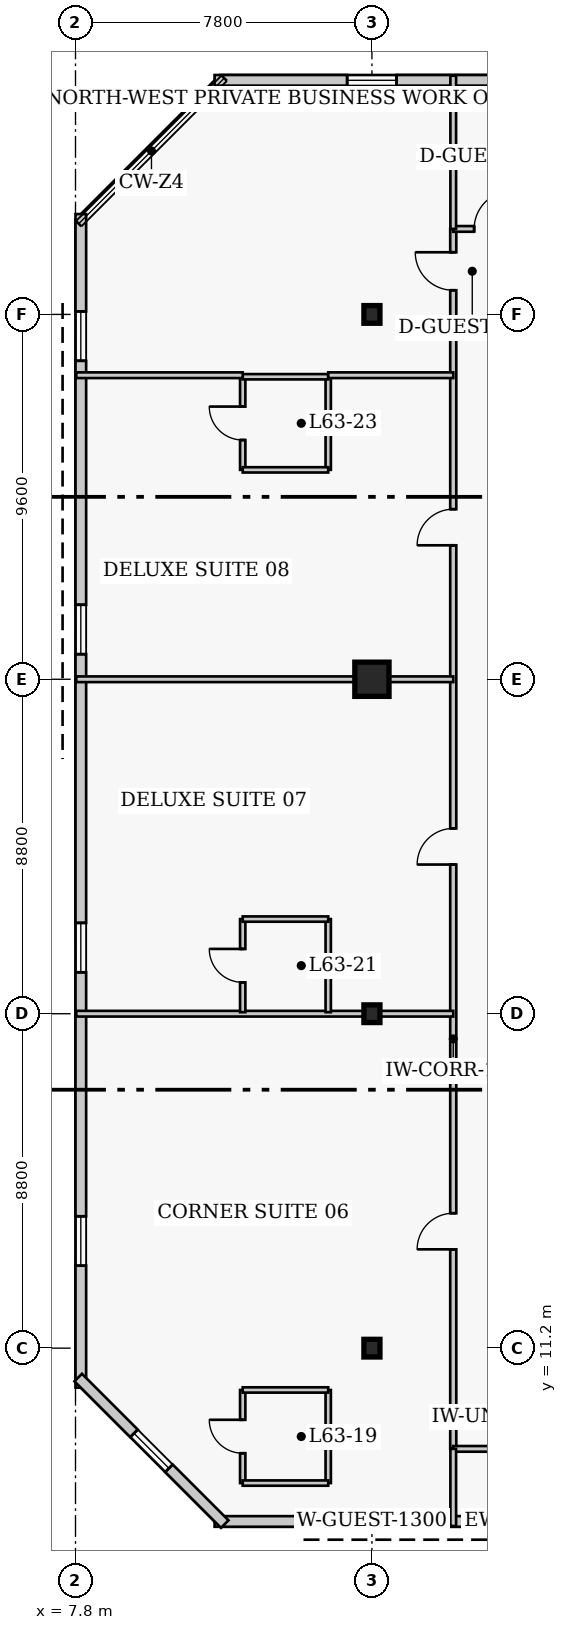
"""IFC4 building model, lengths in metres.
Left out: names, types, materials, properties, quantities, classifications, styles, units other than length and angle.
Written with IfcOpenShell. Run it as: python <this file> out.ifc"""

import sys

from ifc_helpers import new_model, si_unit, direction, frame, frame_2d, origin, origin_2d, place, context, subcontext, project, spatial, rectangle, i_section, extrude, element, fill, save


model = new_model("IFC4")
c1 = context("Model", 3, precision=1e-05, world=origin(), true_north=direction((0.0, 1.0)))
c2 = subcontext(c1, "Body", "Model", "MODEL_VIEW")
j1 = project(units=[si_unit("LENGTHUNIT", "METRE"), si_unit("PLANEANGLEUNIT", "RADIAN")], contexts=[c1])
p1 = place(None, origin())
s1 = spatial("IfcSite", under=j1, at=p1, CompositionType="ELEMENT")
p2 = place(p1, origin())
s2 = spatial("IfcBuilding", under=s1, at=p2, CompositionType="ELEMENT")
p3 = place(p2, frame((0.0, 0.0, 253.4)))
s3 = spatial("IfcBuildingStorey", under=s2, at=p3, CompositionType="ELEMENT", Elevation=253.4)
for number, where, z_axis, x_axis in (
    (1, (15.6, 11.2, 0.0), (0.0, 0.0, 1.0), (1.0, 0.0, 0.0)),
    (2, (15.6, 20.0, 0.0), (0.0, 0.0, 1.0), (1.0, 0.0, 0.0)),
):
    element("IfcColumn", number, at=place(p3, frame(where, z_axis=z_axis, x_axis=x_axis)), inside=s3, PredefinedType="COLUMN", context=c2, shape_type="SweptSolid", body=[
        extrude(i_section(OverallWidth=0.422, OverallDepth=0.465, WebThickness=0.045, FlangeThickness=0.073, FilletRadius=0.017, at=origin_2d()), origin(), (0.0, 0.0, 1.0), 4.0),
    ])
p4 = place(p3, frame((15.6, 28.8, 0.0), z_axis=(0.0, 0.0, 1.0), x_axis=(1.0, 0.0, 0.0)))
e3 = element("IfcColumn", 3, at=p4, inside=s3, PredefinedType="COLUMN", context=c2, shape_type="SweptSolid", body=[
    extrude(rectangle(XDim=0.9, YDim=0.9, at=origin_2d()), origin(), (0.0, 0.0, 1.0), 4.0),
])
p5 = place(p3, frame((15.6, 38.4, 0.0), z_axis=(0.0, 0.0, 1.0), x_axis=(1.0, 0.0, 0.0)))
e4 = element("IfcColumn", 4, at=p5, inside=s3, PredefinedType="COLUMN", context=c2, shape_type="SweptSolid", body=[
    extrude(i_section(OverallWidth=0.422, OverallDepth=0.465, WebThickness=0.045, FlangeThickness=0.073, FilletRadius=0.017, at=origin_2d()), origin(), (0.0, 0.0, 1.0), 4.0),
])
p6 = place(p3, frame((11.46, 6.64, 0.0), z_axis=(0.0, 0.0, 1.0), x_axis=(1.0, 0.0, 0.0)))
e5 = element("IfcWall", 5, at=p6, inside=s3, PredefinedType="SOLIDWALL", context=c2, shape_type="SweptSolid", body=[
    extrude(rectangle(XDim=24.83, YDim=0.28, at=frame_2d((12.415, 0.0))), origin(), (0.0, 0.0, 1.0), 3.76),
])
p7 = place(p6, frame((3.488, 0.0, 0.85)))
e6 = element("IfcOpeningElement", 6, at=p7, cuts=e5, PredefinedType="OPENING", context=c2, shape_type="SweptSolid", body=[
    extrude(rectangle(XDim=1.3, YDim=1.7, at=frame_2d((0.65, 0.85))), frame((0.0, 0.15, 0.0), z_axis=(0.0, -1.0, 0.0), x_axis=(1.0, 0.0, 0.0)), (0.0, 0.0, 1.0), 0.3),
])
p8 = place(p6, frame((20.692, 0.0, 0.85)))
e7 = element("IfcOpeningElement", 7, at=p8, cuts=e5, PredefinedType="OPENING", context=c2, shape_type="SweptSolid", body=[
    extrude(rectangle(XDim=1.3, YDim=1.7, at=frame_2d((0.65, 0.85))), frame((0.0, 0.15, 0.0), z_axis=(0.0, -1.0, 0.0), x_axis=(1.0, 0.0, 0.0)), (0.0, 0.0, 1.0), 0.3),
])
p9 = place(p6, frame((9.82, 0.0, 0.85)))
e8 = element("IfcOpeningElement", 8, at=p9, cuts=e5, PredefinedType="OPENING", context=c2, shape_type="SweptSolid", body=[
    extrude(rectangle(XDim=1.3, YDim=1.7, at=frame_2d((0.65, 0.85))), frame((0.0, 0.15, 0.0), z_axis=(0.0, -1.0, 0.0), x_axis=(1.0, 0.0, 0.0)), (0.0, 0.0, 1.0), 0.3),
])
p10 = place(p6, frame((16.125, 0.0, 0.85)))
e9 = element("IfcOpeningElement", 9, at=p10, cuts=e5, PredefinedType="OPENING", context=c2, shape_type="SweptSolid", body=[
    extrude(rectangle(XDim=1.3, YDim=1.7, at=frame_2d((0.65, 0.85))), frame((0.0, 0.15, 0.0), z_axis=(0.0, -1.0, 0.0), x_axis=(1.0, 0.0, 0.0)), (0.0, 0.0, 1.0), 0.3),
])
p11 = place(p3, frame((36.29, 44.56, 0.0), z_axis=(0.0, 0.0, 1.0), x_axis=(-1.0, 0.0, 0.0)))
e10 = element("IfcWall", 10, at=p11, inside=s3, PredefinedType="SOLIDWALL", context=c2, shape_type="SweptSolid", body=[
    extrude(rectangle(XDim=24.83, YDim=0.28, at=frame_2d((12.415, 0.0))), origin(), (0.0, 0.0, 1.0), 3.76),
])
p12 = place(p11, frame((3.488, 0.0, 0.85)))
e11 = element("IfcOpeningElement", 11, at=p12, cuts=e10, PredefinedType="OPENING", context=c2, shape_type="SweptSolid", body=[
    extrude(rectangle(XDim=1.3, YDim=1.7, at=frame_2d((0.65, 0.85))), frame((0.0, 0.15, 0.0), z_axis=(0.0, -1.0, 0.0), x_axis=(1.0, 0.0, 0.0)), (0.0, 0.0, 1.0), 0.3),
])
p13 = place(p11, frame((11.765, 0.0, 0.85)))
e12 = element("IfcOpeningElement", 12, at=p13, cuts=e10, PredefinedType="OPENING", context=c2, shape_type="SweptSolid", body=[
    extrude(rectangle(XDim=1.3, YDim=1.7, at=frame_2d((0.65, 0.85))), frame((0.0, 0.15, 0.0), z_axis=(0.0, -1.0, 0.0), x_axis=(1.0, 0.0, 0.0)), (0.0, 0.0, 1.0), 0.3),
])
p14 = place(p11, frame((20.042, 0.0, 0.85)))
e13 = element("IfcOpeningElement", 13, at=p14, cuts=e10, PredefinedType="OPENING", context=c2, shape_type="SweptSolid", body=[
    extrude(rectangle(XDim=1.3, YDim=1.7, at=frame_2d((0.65, 0.85))), frame((0.0, 0.15, 0.0), z_axis=(0.0, -1.0, 0.0), x_axis=(1.0, 0.0, 0.0)), (0.0, 0.0, 1.0), 0.3),
])
p15 = place(p3, frame((7.94, 41.04, 0.0), z_axis=(0.0, 0.0, 1.0), x_axis=(0.0, -1.0, 0.0)))
e14 = element("IfcWall", 14, at=p15, inside=s3, PredefinedType="SOLIDWALL", context=c2, shape_type="SweptSolid", body=[
    extrude(rectangle(XDim=30.88, YDim=0.28, at=frame_2d((15.44, 0.0))), origin(), (0.0, 0.0, 1.0), 3.76),
])
p16 = place(p15, frame((2.56, 0.0, 0.85)))
e15 = element("IfcOpeningElement", 15, at=p16, cuts=e14, PredefinedType="OPENING", context=c2, shape_type="SweptSolid", body=[
    extrude(rectangle(XDim=1.3, YDim=1.7, at=frame_2d((0.65, 0.85))), frame((0.0, 0.15, 0.0), z_axis=(0.0, -1.0, 0.0), x_axis=(1.0, 0.0, 0.0)), (0.0, 0.0, 1.0), 0.3),
])
p17 = place(p15, frame((10.28, 0.0, 0.85)))
e16 = element("IfcOpeningElement", 16, at=p17, cuts=e14, PredefinedType="OPENING", context=c2, shape_type="SweptSolid", body=[
    extrude(rectangle(XDim=1.3, YDim=1.7, at=frame_2d((0.65, 0.85))), frame((0.0, 0.15, 0.0), z_axis=(0.0, -1.0, 0.0), x_axis=(1.0, 0.0, 0.0)), (0.0, 0.0, 1.0), 0.3),
])
p18 = place(p15, frame((18.65, 0.0, 0.85)))
e17 = element("IfcOpeningElement", 17, at=p18, cuts=e14, PredefinedType="OPENING", context=c2, shape_type="SweptSolid", body=[
    extrude(rectangle(XDim=1.3, YDim=1.7, at=frame_2d((0.65, 0.85))), frame((0.0, 0.15, 0.0), z_axis=(0.0, -1.0, 0.0), x_axis=(1.0, 0.0, 0.0)), (0.0, 0.0, 1.0), 0.3),
])
p19 = place(p15, frame((26.37, 0.0, 0.85)))
e18 = element("IfcOpeningElement", 18, at=p19, cuts=e14, PredefinedType="OPENING", context=c2, shape_type="SweptSolid", body=[
    extrude(rectangle(XDim=1.3, YDim=1.7, at=frame_2d((0.65, 0.85))), frame((0.0, 0.15, 0.0), z_axis=(0.0, -1.0, 0.0), x_axis=(1.0, 0.0, 0.0)), (0.0, 0.0, 1.0), 0.3),
])
p20 = place(p3, frame((7.871, 10.427, 0.0), z_axis=(0.0, 0.0, 1.0), x_axis=(0.707129162587, -0.707084399077, 0.0)))
e19 = element("IfcWall", 19, at=p20, inside=s3, PredefinedType="SOLIDWALL", context=c2, shape_type="SweptSolid", body=[
    extrude(rectangle(XDim=5.454, YDim=0.28, at=frame_2d((2.727, 0.0))), origin(), (0.0, 0.0, 1.0), 3.76),
])
p21 = place(p20, frame((2.077, 0.0, 0.85)))
e20 = element("IfcOpeningElement", 20, at=p21, cuts=e19, PredefinedType="OPENING", context=c2, shape_type="SweptSolid", body=[
    extrude(rectangle(XDim=1.3, YDim=1.7, at=frame_2d((0.65, 0.85))), frame((0.0, 0.15, 0.0), z_axis=(0.0, -1.0, 0.0), x_axis=(1.0, 0.0, 0.0)), (0.0, 0.0, 1.0), 0.3),
])
p22 = place(p3, frame((17.74, 8.55, 0.0), z_axis=(0.0, 0.0, 1.0), x_axis=(0.0, 1.0, 0.0)))
e21 = element("IfcWall", 21, at=p22, inside=s3, PredefinedType="PARTITIONING", context=c2, shape_type="SweptSolid", body=[
    extrude(rectangle(XDim=32.1, YDim=0.16, at=frame_2d((16.05, 0.0))), origin(), (0.0, 0.0, 1.0), 3.76),
])
p23 = place(p22, frame((5.25, 0.0, 0.0)))
e22 = element("IfcOpeningElement", 22, at=p23, cuts=e21, PredefinedType="OPENING", context=c2, shape_type="SweptSolid", body=[
    extrude(rectangle(XDim=0.95, YDim=2.1, at=frame_2d((0.475, 1.05))), frame((0.0, 0.09, 0.0), z_axis=(0.0, -1.0, 0.0), x_axis=(1.0, 0.0, 0.0)), (0.0, 0.0, 1.0), 0.18),
])
p24 = place(p22, frame((15.375, 0.0, 0.0)))
e23 = element("IfcOpeningElement", 23, at=p24, cuts=e21, PredefinedType="OPENING", context=c2, shape_type="SweptSolid", body=[
    extrude(rectangle(XDim=0.95, YDim=2.1, at=frame_2d((0.475, 1.05))), frame((0.0, 0.09, 0.0), z_axis=(0.0, -1.0, 0.0), x_axis=(1.0, 0.0, 0.0)), (0.0, 0.0, 1.0), 0.18),
])
p25 = place(p22, frame((23.775, 0.0, 0.0)))
e24 = element("IfcOpeningElement", 24, at=p25, cuts=e21, PredefinedType="OPENING", context=c2, shape_type="SweptSolid", body=[
    extrude(rectangle(XDim=0.95, YDim=2.1, at=frame_2d((0.475, 1.05))), frame((0.0, 0.09, 0.0), z_axis=(0.0, -1.0, 0.0), x_axis=(1.0, 0.0, 0.0)), (0.0, 0.0, 1.0), 0.18),
])
p26 = place(p22, frame((30.486, 0.0, 0.0)))
e25 = element("IfcOpeningElement", 25, at=p26, cuts=e21, PredefinedType="OPENING", context=c2, shape_type="SweptSolid", body=[
    extrude(rectangle(XDim=1.0, YDim=2.15, at=frame_2d((0.5, 1.075))), frame((0.0, 0.09, 0.0), z_axis=(0.0, -1.0, 0.0), x_axis=(1.0, 0.0, 0.0)), (0.0, 0.0, 1.0), 0.18),
])
p27 = place(p3, frame((17.74, 8.55, 0.0), z_axis=(0.0, 0.0, 1.0), x_axis=(1.0, 0.0, 0.0)))
e26 = element("IfcWall", 26, at=p27, inside=s3, PredefinedType="PARTITIONING", context=c2, shape_type="SweptSolid", body=[
    extrude(rectangle(XDim=2.22, YDim=0.15, at=frame_2d((1.11, 0.0))), origin(), (0.0, 0.0, 1.0), 3.76),
])
p28 = place(p3, frame((17.74, 40.65, 0.0), z_axis=(0.0, 0.0, 1.0), x_axis=(1.0, 0.0, 0.0)))
e27 = element("IfcWall", 27, at=p28, inside=s3, PredefinedType="PARTITIONING", context=c2, shape_type="SweptSolid", body=[
    extrude(rectangle(XDim=4.36, YDim=0.15, at=frame_2d((2.18, 0.0))), origin(), (0.0, 0.0, 1.0), 3.76),
])
p29 = place(p28, frame((0.55, 0.0, 0.0)))
e28 = element("IfcOpeningElement", 28, at=p29, cuts=e27, PredefinedType="OPENING", context=c2, shape_type="SweptSolid", body=[
    extrude(rectangle(XDim=1.0, YDim=2.15, at=frame_2d((0.5, 1.075))), frame((0.0, 0.085, 0.0), z_axis=(0.0, -1.0, 0.0), x_axis=(1.0, 0.0, 0.0)), (0.0, 0.0, 1.0), 0.17),
])
p30 = place(p3, frame((17.74, 40.65, 0.0), z_axis=(0.0, 0.0, 1.0), x_axis=(0.0, 1.0, 0.0)))
e29 = element("IfcWall", 29, at=p30, inside=s3, PredefinedType="PARTITIONING", context=c2, shape_type="SweptSolid", body=[
    extrude(rectangle(XDim=4.03, YDim=0.15, at=frame_2d((2.015, 0.0))), origin(), (0.0, 0.0, 1.0), 3.76),
])
p31 = place(p3, frame((17.74, 6.52, 0.0), z_axis=(0.0, 0.0, 1.0), x_axis=(0.0, 1.0, 0.0)))
e30 = element("IfcWall", 30, at=p31, inside=s3, PredefinedType="PARTITIONING", context=c2, shape_type="SweptSolid", body=[
    extrude(rectangle(XDim=2.03, YDim=0.15, at=frame_2d((1.015, 0.0))), origin(), (0.0, 0.0, 1.0), 3.76),
])
p32 = place(p3, frame((12.2, 7.65, 0.0), z_axis=(0.0, 0.0, 1.0), x_axis=(0.0, 1.0, 0.0)))
e31 = element("IfcWall", 31, at=p32, inside=s3, PredefinedType="PLUMBINGWALL", context=c2, shape_type="SweptSolid", body=[
    extrude(rectangle(XDim=2.45, YDim=0.14, at=frame_2d((1.225, 0.0))), origin(), (0.0, 0.0, 1.0), 3.76),
])
p33 = place(p32, frame((0.785, 0.0, 0.0)))
e32 = element("IfcOpeningElement", 32, at=p33, cuts=e31, PredefinedType="OPENING", context=c2, shape_type="SweptSolid", body=[
    extrude(rectangle(XDim=0.88, YDim=2.05, at=frame_2d((0.44, 1.025))), frame((0.0, 0.08, 0.0), z_axis=(0.0, -1.0, 0.0), x_axis=(1.0, 0.0, 0.0)), (0.0, 0.0, 1.0), 0.16),
])
p34 = place(p3, frame((14.45, 7.65, 0.0), z_axis=(0.0, 0.0, 1.0), x_axis=(0.0, 1.0, 0.0)))
e33 = element("IfcWall", 33, at=p34, inside=s3, PredefinedType="PLUMBINGWALL", context=c2, shape_type="SweptSolid", body=[
    extrude(rectangle(XDim=2.45, YDim=0.14, at=frame_2d((1.225, 0.0))), origin(), (0.0, 0.0, 1.0), 3.76),
])
for number, where, z_axis, x_axis in (
    (34, (12.2, 7.65, 0.0), (0.0, 0.0, 1.0), (1.0, 0.0, 0.0)),
    (35, (12.2, 10.1, 0.0), (0.0, 0.0, 1.0), (1.0, 0.0, 0.0)),
):
    element("IfcWall", number, at=place(p3, frame(where, z_axis=z_axis, x_axis=x_axis)), inside=s3, PredefinedType="PLUMBINGWALL", context=c2, shape_type="SweptSolid", body=[
        extrude(rectangle(XDim=2.25, YDim=0.14, at=frame_2d((1.125, 0.0))), origin(), (0.0, 0.0, 1.0), 3.76),
    ])
p35 = place(p3, frame((7.82, 20.0, 0.0), z_axis=(0.0, 0.0, 1.0), x_axis=(1.0, 0.0, 0.0)))
e36 = element("IfcWall", 36, at=p35, inside=s3, PredefinedType="PARTITIONING", context=c2, shape_type="SweptSolid", body=[
    extrude(rectangle(XDim=9.92, YDim=0.15, at=frame_2d((4.96, 0.0))), origin(), (0.0, 0.0, 1.0), 3.064),
])
p36 = place(p3, frame((12.2, 20.04, 0.0), z_axis=(0.0, 0.0, 1.0), x_axis=(0.0, 1.0, 0.0)))
e37 = element("IfcWall", 37, at=p36, inside=s3, PredefinedType="PLUMBINGWALL", context=c2, shape_type="SweptSolid", body=[
    extrude(rectangle(XDim=2.45, YDim=0.14, at=frame_2d((1.225, 0.0))), origin(), (0.0, 0.0, 1.0), 3.76),
])
p37 = place(p36, frame((0.785, 0.0, 0.0)))
e38 = element("IfcOpeningElement", 38, at=p37, cuts=e37, PredefinedType="OPENING", context=c2, shape_type="SweptSolid", body=[
    extrude(rectangle(XDim=0.88, YDim=2.05, at=frame_2d((0.44, 1.025))), frame((0.0, 0.08, 0.0), z_axis=(0.0, -1.0, 0.0), x_axis=(1.0, 0.0, 0.0)), (0.0, 0.0, 1.0), 0.16),
])
p38 = place(p3, frame((14.45, 20.04, 0.0), z_axis=(0.0, 0.0, 1.0), x_axis=(0.0, 1.0, 0.0)))
e39 = element("IfcWall", 39, at=p38, inside=s3, PredefinedType="PLUMBINGWALL", context=c2, shape_type="SweptSolid", body=[
    extrude(rectangle(XDim=2.45, YDim=0.14, at=frame_2d((1.225, 0.0))), origin(), (0.0, 0.0, 1.0), 3.76),
])
p39 = place(p3, frame((12.2, 22.49, 0.0), z_axis=(0.0, 0.0, 1.0), x_axis=(1.0, 0.0, 0.0)))
e40 = element("IfcWall", 40, at=p39, inside=s3, PredefinedType="PLUMBINGWALL", context=c2, shape_type="SweptSolid", body=[
    extrude(rectangle(XDim=2.25, YDim=0.14, at=frame_2d((1.125, 0.0))), origin(), (0.0, 0.0, 1.0), 3.76),
])
p40 = place(p3, frame((7.82, 28.8, 0.0), z_axis=(0.0, 0.0, 1.0), x_axis=(1.0, 0.0, 0.0)))
e41 = element("IfcWall", 41, at=p40, inside=s3, PredefinedType="PARTITIONING", context=c2, shape_type="SweptSolid", body=[
    extrude(rectangle(XDim=9.92, YDim=0.15, at=frame_2d((4.96, 0.0))), origin(), (0.0, 0.0, 1.0), 3.064),
])
p41 = place(p3, frame((12.2, 34.31, 0.0), z_axis=(0.0, 0.0, 1.0), x_axis=(0.0, 1.0, 0.0)))
e42 = element("IfcWall", 42, at=p41, inside=s3, PredefinedType="PLUMBINGWALL", context=c2, shape_type="SweptSolid", body=[
    extrude(rectangle(XDim=2.45, YDim=0.14, at=frame_2d((1.225, 0.0))), origin(), (0.0, 0.0, 1.0), 3.76),
])
p42 = place(p41, frame((0.785, 0.0, 0.0)))
e43 = element("IfcOpeningElement", 43, at=p42, cuts=e42, PredefinedType="OPENING", context=c2, shape_type="SweptSolid", body=[
    extrude(rectangle(XDim=0.88, YDim=2.05, at=frame_2d((0.44, 1.025))), frame((0.0, 0.08, 0.0), z_axis=(0.0, -1.0, 0.0), x_axis=(1.0, 0.0, 0.0)), (0.0, 0.0, 1.0), 0.16),
])
p43 = place(p3, frame((14.45, 34.31, 0.0), z_axis=(0.0, 0.0, 1.0), x_axis=(0.0, 1.0, 0.0)))
e44 = element("IfcWall", 44, at=p43, inside=s3, PredefinedType="PLUMBINGWALL", context=c2, shape_type="SweptSolid", body=[
    extrude(rectangle(XDim=2.45, YDim=0.14, at=frame_2d((1.225, 0.0))), origin(), (0.0, 0.0, 1.0), 3.76),
])
for number, where, z_axis, x_axis in (
    (45, (12.2, 34.31, 0.0), (0.0, 0.0, 1.0), (1.0, 0.0, 0.0)),
    (46, (12.2, 36.76, 0.0), (0.0, 0.0, 1.0), (1.0, 0.0, 0.0)),
):
    element("IfcWall", number, at=place(p3, frame(where, z_axis=z_axis, x_axis=x_axis)), inside=s3, PredefinedType="PLUMBINGWALL", context=c2, shape_type="SweptSolid", body=[
        extrude(rectangle(XDim=2.25, YDim=0.14, at=frame_2d((1.125, 0.0))), origin(), (0.0, 0.0, 1.0), 3.76),
    ])
p44 = place(p3, frame((7.82, 36.8, 0.0), z_axis=(0.0, 0.0, 1.0), x_axis=(1.0, 0.0, 0.0)))
e47 = element("IfcWall", 47, at=p44, inside=s3, PredefinedType="PARTITIONING", context=c2, shape_type="SweptSolid", body=[
    extrude(rectangle(XDim=4.38, YDim=0.15, at=frame_2d((2.19, 0.0))), origin(), (0.0, 0.0, 1.0), 3.76),
])
p45 = place(p3, frame((14.45, 36.8, 0.0), z_axis=(0.0, 0.0, 1.0), x_axis=(1.0, 0.0, 0.0)))
e48 = element("IfcWall", 48, at=p45, inside=s3, PredefinedType="PARTITIONING", context=c2, shape_type="SweptSolid", body=[
    extrude(rectangle(XDim=3.29, YDim=0.15, at=frame_2d((1.645, 0.0))), origin(), (0.0, 0.0, 1.0), 3.76),
])
p46 = place(p7, origin())
e49 = element("IfcWindow", 49, at=p46, inside=s3, PartitioningType="SINGLE_PANEL", PredefinedType="WINDOW", context=c2, shape_type="SweptSolid", body=[
    extrude(rectangle(XDim=1.3, YDim=1.7, at=frame_2d((0.65, 0.85))), frame((0.0, 0.03, 0.0), z_axis=(0.0, -1.0, 0.0), x_axis=(1.0, 0.0, 0.0)), (0.0, 0.0, 1.0), 0.06),
])
fill(e6, e49)
p47 = place(p14, origin())
e50 = element("IfcWindow", 50, at=p47, inside=s3, PartitioningType="SINGLE_PANEL", PredefinedType="WINDOW", context=c2, shape_type="SweptSolid", body=[
    extrude(rectangle(XDim=1.3, YDim=1.7, at=frame_2d((0.65, 0.85))), frame((0.0, 0.03, 0.0), z_axis=(0.0, -1.0, 0.0), x_axis=(1.0, 0.0, 0.0)), (0.0, 0.0, 1.0), 0.06),
])
fill(e13, e50)
p48 = place(p16, origin())
e51 = element("IfcWindow", 51, at=p48, inside=s3, PartitioningType="SINGLE_PANEL", PredefinedType="WINDOW", context=c2, shape_type="SweptSolid", body=[
    extrude(rectangle(XDim=1.3, YDim=1.7, at=frame_2d((0.65, 0.85))), frame((0.0, 0.03, 0.0), z_axis=(0.0, -1.0, 0.0), x_axis=(1.0, 0.0, 0.0)), (0.0, 0.0, 1.0), 0.06),
])
fill(e15, e51)
p49 = place(p17, origin())
e52 = element("IfcWindow", 52, at=p49, inside=s3, PartitioningType="SINGLE_PANEL", PredefinedType="WINDOW", context=c2, shape_type="SweptSolid", body=[
    extrude(rectangle(XDim=1.3, YDim=1.7, at=frame_2d((0.65, 0.85))), frame((0.0, 0.03, 0.0), z_axis=(0.0, -1.0, 0.0), x_axis=(1.0, 0.0, 0.0)), (0.0, 0.0, 1.0), 0.06),
])
fill(e16, e52)
p50 = place(p18, origin())
e53 = element("IfcWindow", 53, at=p50, inside=s3, PartitioningType="SINGLE_PANEL", PredefinedType="WINDOW", context=c2, shape_type="SweptSolid", body=[
    extrude(rectangle(XDim=1.3, YDim=1.7, at=frame_2d((0.65, 0.85))), frame((0.0, 0.03, 0.0), z_axis=(0.0, -1.0, 0.0), x_axis=(1.0, 0.0, 0.0)), (0.0, 0.0, 1.0), 0.06),
])
fill(e17, e53)
p51 = place(p19, origin())
e54 = element("IfcWindow", 54, at=p51, inside=s3, PartitioningType="SINGLE_PANEL", PredefinedType="WINDOW", context=c2, shape_type="SweptSolid", body=[
    extrude(rectangle(XDim=1.3, YDim=1.7, at=frame_2d((0.65, 0.85))), frame((0.0, 0.03, 0.0), z_axis=(0.0, -1.0, 0.0), x_axis=(1.0, 0.0, 0.0)), (0.0, 0.0, 1.0), 0.06),
])
fill(e18, e54)
p52 = place(p21, origin())
e55 = element("IfcWindow", 55, at=p52, inside=s3, PartitioningType="SINGLE_PANEL", PredefinedType="WINDOW", context=c2, shape_type="SweptSolid", body=[
    extrude(rectangle(XDim=1.3, YDim=1.7, at=frame_2d((0.65, 0.85))), frame((0.0, 0.03, 0.0), z_axis=(0.0, -1.0, 0.0), x_axis=(1.0, 0.0, 0.0)), (0.0, 0.0, 1.0), 0.06),
])
fill(e20, e55)
p53 = place(p29, origin())
e56 = element("IfcDoor", 56, at=p53, inside=s3, OperationType="SINGLE_SWING_RIGHT", PredefinedType="DOOR", context=c2, shape_type="SweptSolid", body=[
    extrude(rectangle(XDim=1.0, YDim=2.15, at=frame_2d((0.5, 1.075))), frame((0.0, 0.025, 0.0), z_axis=(0.0, -1.0, 0.0), x_axis=(1.0, 0.0, 0.0)), (0.0, 0.0, 1.0), 0.05),
])
fill(e28, e56)
p54 = place(p33, origin())
e57 = element("IfcDoor", 57, at=p54, inside=s3, OperationType="SINGLE_SWING_RIGHT", PredefinedType="DOOR", context=c2, shape_type="SweptSolid", body=[
    extrude(rectangle(XDim=0.88, YDim=2.05, at=frame_2d((0.44, 1.025))), frame((0.0, 0.025, 0.0), z_axis=(0.0, -1.0, 0.0), x_axis=(1.0, 0.0, 0.0)), (0.0, 0.0, 1.0), 0.05),
])
fill(e32, e57)
p55 = place(p23, origin())
e58 = element("IfcDoor", 58, at=p55, inside=s3, OperationType="SINGLE_SWING_LEFT", PredefinedType="DOOR", context=c2, shape_type="SweptSolid", body=[
    extrude(rectangle(XDim=0.95, YDim=2.1, at=frame_2d((0.475, 1.05))), frame((0.0, 0.025, 0.0), z_axis=(0.0, -1.0, 0.0), x_axis=(1.0, 0.0, 0.0)), (0.0, 0.0, 1.0), 0.05),
])
fill(e22, e58)
p56 = place(p37, origin())
e59 = element("IfcDoor", 59, at=p56, inside=s3, OperationType="SINGLE_SWING_RIGHT", PredefinedType="DOOR", context=c2, shape_type="SweptSolid", body=[
    extrude(rectangle(XDim=0.88, YDim=2.05, at=frame_2d((0.44, 1.025))), frame((0.0, 0.025, 0.0), z_axis=(0.0, -1.0, 0.0), x_axis=(1.0, 0.0, 0.0)), (0.0, 0.0, 1.0), 0.05),
])
fill(e38, e59)
p57 = place(p24, origin())
e60 = element("IfcDoor", 60, at=p57, inside=s3, OperationType="SINGLE_SWING_LEFT", PredefinedType="DOOR", context=c2, shape_type="SweptSolid", body=[
    extrude(rectangle(XDim=0.95, YDim=2.1, at=frame_2d((0.475, 1.05))), frame((0.0, 0.025, 0.0), z_axis=(0.0, -1.0, 0.0), x_axis=(1.0, 0.0, 0.0)), (0.0, 0.0, 1.0), 0.05),
])
fill(e23, e60)
p58 = place(p42, origin())
e61 = element("IfcDoor", 61, at=p58, inside=s3, OperationType="SINGLE_SWING_RIGHT", PredefinedType="DOOR", context=c2, shape_type="SweptSolid", body=[
    extrude(rectangle(XDim=0.88, YDim=2.05, at=frame_2d((0.44, 1.025))), frame((0.0, 0.025, 0.0), z_axis=(0.0, -1.0, 0.0), x_axis=(1.0, 0.0, 0.0)), (0.0, 0.0, 1.0), 0.05),
])
fill(e43, e61)
p59 = place(p25, origin())
e62 = element("IfcDoor", 62, at=p59, inside=s3, OperationType="SINGLE_SWING_LEFT", PredefinedType="DOOR", context=c2, shape_type="SweptSolid", body=[
    extrude(rectangle(XDim=0.95, YDim=2.1, at=frame_2d((0.475, 1.05))), frame((0.0, 0.025, 0.0), z_axis=(0.0, -1.0, 0.0), x_axis=(1.0, 0.0, 0.0)), (0.0, 0.0, 1.0), 0.05),
])
fill(e24, e62)
p60 = place(p26, origin())
e63 = element("IfcDoor", 63, at=p60, inside=s3, OperationType="SINGLE_SWING_RIGHT", PredefinedType="DOOR", context=c2, shape_type="SweptSolid", body=[
    extrude(rectangle(XDim=1.0, YDim=2.15, at=frame_2d((0.5, 1.075))), frame((0.0, 0.025, 0.0), z_axis=(0.0, -1.0, 0.0), x_axis=(1.0, 0.0, 0.0)), (0.0, 0.0, 1.0), 0.05),
])
fill(e25, e63)
save(model, sys.argv[1])
